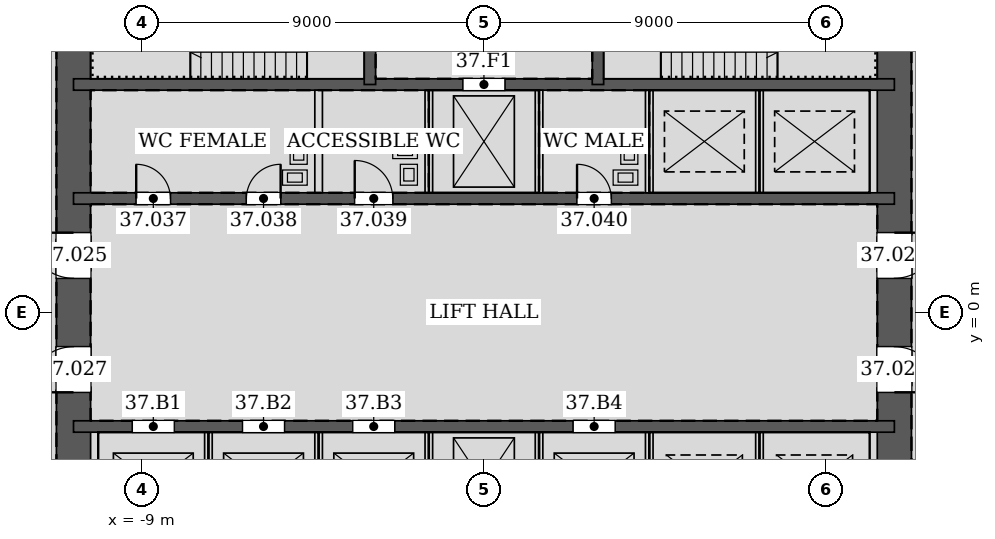
"""IFC4 building model, lengths in metres.
Left out: names, types, materials, properties, quantities, classifications, styles, units other than length and angle.
Written with IfcOpenShell. Run it as: python <this file> out.ifc"""

import sys

from ifc_helpers import new_model, si_unit, direction, frame, frame_2d, origin, place, context, subcontext, project, spatial, rectangle, extrude, element, fill, save


model = new_model("IFC4")
c1 = context("Model", 3, precision=1e-05, world=origin(), true_north=direction((0.0, 1.0)))
c2 = subcontext(c1, "Body", "Model", "MODEL_VIEW")
j1 = project(units=[si_unit("LENGTHUNIT", "METRE"), si_unit("PLANEANGLEUNIT", "RADIAN")], contexts=[c1])
p1 = place(None, origin())
s1 = spatial("IfcSite", under=j1, at=p1, CompositionType="ELEMENT")
p2 = place(p1, origin())
s2 = spatial("IfcBuilding", under=s1, at=p2, CompositionType="ELEMENT")
p3 = place(p2, frame((0.0, 0.0, 163.8)))
s3 = spatial("IfcBuildingStorey", under=s2, at=p3, CompositionType="ELEMENT", Elevation=163.8)
p4 = place(p3, frame((10.8, -10.8, 0.0), z_axis=(0.0, 0.0, 1.0), x_axis=(0.0, 1.0, 0.0)))
e1 = element("IfcWall", 1, at=p4, inside=s3, PredefinedType="SOLIDWALL", context=c2, shape_type="SweptSolid", body=[
    extrude(rectangle(XDim=21.6, YDim=0.9, at=frame_2d((10.8, 0.0))), origin(), (0.0, 0.0, 1.0), 4.2),
])
p5 = place(p4, frame((11.7, 0.0, 0.0)))
e2 = element("IfcOpeningElement", 2, at=p5, cuts=e1, PredefinedType="OPENING", context=c2, shape_type="SweptSolid", body=[
    extrude(rectangle(XDim=1.2, YDim=2.1, at=frame_2d((0.6, 1.05))), frame((0.0, 0.46, 0.0), z_axis=(0.0, -1.0, 0.0), x_axis=(1.0, 0.0, 0.0)), (0.0, 0.0, 1.0), 0.92),
])
p6 = place(p4, frame((8.7, 0.0, 0.0)))
e3 = element("IfcOpeningElement", 3, at=p6, cuts=e1, PredefinedType="OPENING", context=c2, shape_type="SweptSolid", body=[
    extrude(rectangle(XDim=1.2, YDim=2.1, at=frame_2d((0.6, 1.05))), frame((0.0, 0.46, 0.0), z_axis=(0.0, -1.0, 0.0), x_axis=(1.0, 0.0, 0.0)), (0.0, 0.0, 1.0), 0.92),
])
p7 = place(p3, frame((-10.8, 10.8, 0.0), z_axis=(0.0, 0.0, 1.0), x_axis=(0.0, -1.0, 0.0)))
e4 = element("IfcWall", 4, at=p7, inside=s3, PredefinedType="SOLIDWALL", context=c2, shape_type="SweptSolid", body=[
    extrude(rectangle(XDim=21.6, YDim=0.9, at=frame_2d((10.8, 0.0))), origin(), (0.0, 0.0, 1.0), 4.2),
])
p8 = place(p7, frame((8.7, 0.0, 0.0)))
e5 = element("IfcOpeningElement", 5, at=p8, cuts=e4, PredefinedType="OPENING", context=c2, shape_type="SweptSolid", body=[
    extrude(rectangle(XDim=1.2, YDim=2.1, at=frame_2d((0.6, 1.05))), frame((0.0, 0.46, 0.0), z_axis=(0.0, -1.0, 0.0), x_axis=(1.0, 0.0, 0.0)), (0.0, 0.0, 1.0), 0.92),
])
p9 = place(p7, frame((11.7, 0.0, 0.0)))
e6 = element("IfcOpeningElement", 6, at=p9, cuts=e4, PredefinedType="OPENING", context=c2, shape_type="SweptSolid", body=[
    extrude(rectangle(XDim=1.2, YDim=2.1, at=frame_2d((0.6, 1.05))), frame((0.0, 0.46, 0.0), z_axis=(0.0, -1.0, 0.0), x_axis=(1.0, 0.0, 0.0)), (0.0, 0.0, 1.0), 0.92),
])
p10 = place(p3, frame((-10.8, 3.0, 0.0), z_axis=(0.0, 0.0, 1.0), x_axis=(1.0, 0.0, 0.0)))
e7 = element("IfcWall", 7, at=p10, inside=s3, PredefinedType="SOLIDWALL", context=c2, shape_type="SweptSolid", body=[
    extrude(rectangle(XDim=21.6, YDim=0.3, at=frame_2d((10.8, 0.0))), origin(), (0.0, 0.0, 1.0), 4.2),
])
p11 = place(p10, frame((1.65, 0.0, 0.0)))
e8 = element("IfcOpeningElement", 8, at=p11, cuts=e7, PredefinedType="OPENING", context=c2, shape_type="SweptSolid", body=[
    extrude(rectangle(XDim=0.9, YDim=2.1, at=frame_2d((0.45, 1.05))), frame((0.0, 0.16, 0.0), z_axis=(0.0, -1.0, 0.0), x_axis=(1.0, 0.0, 0.0)), (0.0, 0.0, 1.0), 0.32),
])
p12 = place(p10, frame((4.55, 0.0, 0.0)))
e9 = element("IfcOpeningElement", 9, at=p12, cuts=e7, PredefinedType="OPENING", context=c2, shape_type="SweptSolid", body=[
    extrude(rectangle(XDim=0.9, YDim=2.1, at=frame_2d((0.45, 1.05))), frame((0.0, 0.16, 0.0), z_axis=(0.0, -1.0, 0.0), x_axis=(1.0, 0.0, 0.0)), (0.0, 0.0, 1.0), 0.32),
])
p13 = place(p10, frame((7.4, 0.0, 0.0)))
e10 = element("IfcOpeningElement", 10, at=p13, cuts=e7, PredefinedType="OPENING", context=c2, shape_type="SweptSolid", body=[
    extrude(rectangle(XDim=1.0, YDim=2.1, at=frame_2d((0.5, 1.05))), frame((0.0, 0.16, 0.0), z_axis=(0.0, -1.0, 0.0), x_axis=(1.0, 0.0, 0.0)), (0.0, 0.0, 1.0), 0.32),
])
p14 = place(p10, frame((13.25, 0.0, 0.0)))
e11 = element("IfcOpeningElement", 11, at=p14, cuts=e7, PredefinedType="OPENING", context=c2, shape_type="SweptSolid", body=[
    extrude(rectangle(XDim=0.9, YDim=2.1, at=frame_2d((0.45, 1.05))), frame((0.0, 0.16, 0.0), z_axis=(0.0, -1.0, 0.0), x_axis=(1.0, 0.0, 0.0)), (0.0, 0.0, 1.0), 0.32),
])
p15 = place(p3, frame((-10.8, 6.0, 0.0), z_axis=(0.0, 0.0, 1.0), x_axis=(1.0, 0.0, 0.0)))
e12 = element("IfcWall", 12, at=p15, inside=s3, PredefinedType="SOLIDWALL", context=c2, shape_type="SweptSolid", body=[
    extrude(rectangle(XDim=21.6, YDim=0.3, at=frame_2d((10.8, 0.0))), origin(), (0.0, 0.0, 1.0), 4.2),
])
p16 = place(p15, frame((10.25, 0.0, 0.0)))
e13 = element("IfcOpeningElement", 13, at=p16, cuts=e12, PredefinedType="OPENING", context=c2, shape_type="SweptSolid", body=[
    extrude(rectangle(XDim=1.1, YDim=2.1, at=frame_2d((0.55, 1.05))), frame((0.0, 0.16, 0.0), z_axis=(0.0, -1.0, 0.0), x_axis=(1.0, 0.0, 0.0)), (0.0, 0.0, 1.0), 0.32),
])
p17 = place(p3, frame((-3.0, 6.0, 0.0), z_axis=(0.0, 0.0, 1.0), x_axis=(0.0, 1.0, 0.0)))
e14 = element("IfcWall", 14, at=p17, inside=s3, PredefinedType="SOLIDWALL", context=c2, shape_type="SweptSolid", body=[
    extrude(rectangle(XDim=4.8, YDim=0.3, at=frame_2d((2.4, 0.0))), origin(), (0.0, 0.0, 1.0), 4.2),
])
p18 = place(p17, frame((1.75, 0.0, 0.0)))
e15 = element("IfcOpeningElement", 15, at=p18, cuts=e14, PredefinedType="OPENING", context=c2, shape_type="SweptSolid", body=[
    extrude(rectangle(XDim=1.0, YDim=2.1, at=frame_2d((0.5, 1.05))), frame((0.0, 0.16, 0.0), z_axis=(0.0, -1.0, 0.0), x_axis=(1.0, 0.0, 0.0)), (0.0, 0.0, 1.0), 0.32),
])
p19 = place(p3, frame((3.0, 6.0, 0.0), z_axis=(0.0, 0.0, 1.0), x_axis=(0.0, 1.0, 0.0)))
e16 = element("IfcWall", 16, at=p19, inside=s3, PredefinedType="SOLIDWALL", context=c2, shape_type="SweptSolid", body=[
    extrude(rectangle(XDim=4.8, YDim=0.3, at=frame_2d((2.4, 0.0))), origin(), (0.0, 0.0, 1.0), 4.2),
])
p20 = place(p19, frame((1.75, 0.0, 0.0)))
e17 = element("IfcOpeningElement", 17, at=p20, cuts=e16, PredefinedType="OPENING", context=c2, shape_type="SweptSolid", body=[
    extrude(rectangle(XDim=1.0, YDim=2.1, at=frame_2d((0.5, 1.05))), frame((0.0, 0.16, 0.0), z_axis=(0.0, -1.0, 0.0), x_axis=(1.0, 0.0, 0.0)), (0.0, 0.0, 1.0), 0.32),
])
p21 = place(p3, frame((-10.8, -3.0, 0.0), z_axis=(0.0, 0.0, 1.0), x_axis=(1.0, 0.0, 0.0)))
e18 = element("IfcWall", 18, at=p21, inside=s3, PredefinedType="SOLIDWALL", context=c2, shape_type="SweptSolid", body=[
    extrude(rectangle(XDim=21.6, YDim=0.3, at=frame_2d((10.8, 0.0))), origin(), (0.0, 0.0, 1.0), 4.2),
])
p22 = place(p21, frame((1.55, 0.0, 0.0)))
e19 = element("IfcOpeningElement", 19, at=p22, cuts=e18, PredefinedType="OPENING", context=c2, shape_type="SweptSolid", body=[
    extrude(rectangle(XDim=1.1, YDim=2.1, at=frame_2d((0.55, 1.05))), frame((0.0, 0.16, 0.0), z_axis=(0.0, -1.0, 0.0), x_axis=(1.0, 0.0, 0.0)), (0.0, 0.0, 1.0), 0.32),
])
p23 = place(p21, frame((4.45, 0.0, 0.0)))
e20 = element("IfcOpeningElement", 20, at=p23, cuts=e18, PredefinedType="OPENING", context=c2, shape_type="SweptSolid", body=[
    extrude(rectangle(XDim=1.1, YDim=2.1, at=frame_2d((0.55, 1.05))), frame((0.0, 0.16, 0.0), z_axis=(0.0, -1.0, 0.0), x_axis=(1.0, 0.0, 0.0)), (0.0, 0.0, 1.0), 0.32),
])
p24 = place(p21, frame((7.35, 0.0, 0.0)))
e21 = element("IfcOpeningElement", 21, at=p24, cuts=e18, PredefinedType="OPENING", context=c2, shape_type="SweptSolid", body=[
    extrude(rectangle(XDim=1.1, YDim=2.1, at=frame_2d((0.55, 1.05))), frame((0.0, 0.16, 0.0), z_axis=(0.0, -1.0, 0.0), x_axis=(1.0, 0.0, 0.0)), (0.0, 0.0, 1.0), 0.32),
])
p25 = place(p21, frame((13.15, 0.0, 0.0)))
e22 = element("IfcOpeningElement", 22, at=p25, cuts=e18, PredefinedType="OPENING", context=c2, shape_type="SweptSolid", body=[
    extrude(rectangle(XDim=1.1, YDim=2.1, at=frame_2d((0.55, 1.05))), frame((0.0, 0.16, 0.0), z_axis=(0.0, -1.0, 0.0), x_axis=(1.0, 0.0, 0.0)), (0.0, 0.0, 1.0), 0.32),
])
for number, where, z_axis, x_axis in (
    (23, (-4.35, 3.15, 0.0), (0.0, 0.0, 1.0), (0.0, 1.0, 0.0)),
    (24, (-1.45, 3.15, 0.0), (0.0, 0.0, 1.0), (0.0, 1.0, 0.0)),
    (25, (1.45, 3.15, 0.0), (0.0, 0.0, 1.0), (0.0, 1.0, 0.0)),
    (26, (4.35, 3.15, 0.0), (0.0, 0.0, 1.0), (0.0, 1.0, 0.0)),
):
    element("IfcWall", number, at=place(p3, frame(where, z_axis=z_axis, x_axis=x_axis)), inside=s3, PredefinedType="PARTITIONING", context=c2, shape_type="SweptSolid", body=[
        extrude(rectangle(XDim=2.7, YDim=0.2, at=frame_2d((1.35, 0.0))), origin(), (0.0, 0.0, 1.0), 4.035),
    ])
for number, where, z_axis, x_axis in (
    (27, (7.25, 3.15, 0.0), (0.0, 0.0, 1.0), (0.0, 1.0, 0.0)),
    (28, (-7.25, -5.85, 0.0), (0.0, 0.0, 1.0), (0.0, 1.0, 0.0)),
    (29, (-4.35, -5.85, 0.0), (0.0, 0.0, 1.0), (0.0, 1.0, 0.0)),
    (30, (-1.45, -5.85, 0.0), (0.0, 0.0, 1.0), (0.0, 1.0, 0.0)),
    (31, (1.45, -5.85, 0.0), (0.0, 0.0, 1.0), (0.0, 1.0, 0.0)),
    (32, (4.35, -5.85, 0.0), (0.0, 0.0, 1.0), (0.0, 1.0, 0.0)),
    (33, (7.25, -5.85, 0.0), (0.0, 0.0, 1.0), (0.0, 1.0, 0.0)),
):
    element("IfcWall", number, at=place(p3, frame(where, z_axis=z_axis, x_axis=x_axis)), inside=s3, PredefinedType="PARTITIONING", context=c2, shape_type="SweptSolid", body=[
        extrude(rectangle(XDim=2.7, YDim=0.2, at=frame_2d((1.35, 0.0))), origin(), (0.0, 0.0, 1.0), 4.2),
    ])
p26 = place(p5, frame((1.2, 0.0, 0.0), z_axis=(0.0, 0.0, 1.0), x_axis=(-1.0, 0.0, 0.0)))
e34 = element("IfcDoor", 34, at=p26, inside=s3, OperationType="SINGLE_SWING_LEFT", PredefinedType="DOOR", context=c2, shape_type="SweptSolid", body=[
    extrude(rectangle(XDim=1.2, YDim=2.1, at=frame_2d((0.6, 1.05))), frame((0.0, 0.025, 0.0), z_axis=(0.0, -1.0, 0.0), x_axis=(1.0, 0.0, 0.0)), (0.0, 0.0, 1.0), 0.05),
])
fill(e2, e34)
p27 = place(p8, frame((1.2, 0.0, 0.0), z_axis=(0.0, 0.0, 1.0), x_axis=(-1.0, 0.0, 0.0)))
e35 = element("IfcDoor", 35, at=p27, inside=s3, OperationType="SINGLE_SWING_RIGHT", PredefinedType="DOOR", context=c2, shape_type="SweptSolid", body=[
    extrude(rectangle(XDim=1.2, YDim=2.1, at=frame_2d((0.6, 1.05))), frame((0.0, 0.025, 0.0), z_axis=(0.0, -1.0, 0.0), x_axis=(1.0, 0.0, 0.0)), (0.0, 0.0, 1.0), 0.05),
])
fill(e5, e35)
p28 = place(p6, frame((1.2, 0.0, 0.0), z_axis=(0.0, 0.0, 1.0), x_axis=(-1.0, 0.0, 0.0)))
e36 = element("IfcDoor", 36, at=p28, inside=s3, OperationType="SINGLE_SWING_RIGHT", PredefinedType="DOOR", context=c2, shape_type="SweptSolid", body=[
    extrude(rectangle(XDim=1.2, YDim=2.1, at=frame_2d((0.6, 1.05))), frame((0.0, 0.025, 0.0), z_axis=(0.0, -1.0, 0.0), x_axis=(1.0, 0.0, 0.0)), (0.0, 0.0, 1.0), 0.05),
])
fill(e3, e36)
p29 = place(p9, frame((1.2, 0.0, 0.0), z_axis=(0.0, 0.0, 1.0), x_axis=(-1.0, 0.0, 0.0)))
e37 = element("IfcDoor", 37, at=p29, inside=s3, OperationType="SINGLE_SWING_LEFT", PredefinedType="DOOR", context=c2, shape_type="SweptSolid", body=[
    extrude(rectangle(XDim=1.2, YDim=2.1, at=frame_2d((0.6, 1.05))), frame((0.0, 0.025, 0.0), z_axis=(0.0, -1.0, 0.0), x_axis=(1.0, 0.0, 0.0)), (0.0, 0.0, 1.0), 0.05),
])
fill(e6, e37)
p30 = place(p11, origin())
e38 = element("IfcDoor", 38, at=p30, inside=s3, OperationType="SINGLE_SWING_LEFT", PredefinedType="DOOR", context=c2, shape_type="SweptSolid", body=[
    extrude(rectangle(XDim=0.9, YDim=2.1, at=frame_2d((0.45, 1.05))), frame((0.0, 0.025, 0.0), z_axis=(0.0, -1.0, 0.0), x_axis=(1.0, 0.0, 0.0)), (0.0, 0.0, 1.0), 0.05),
])
fill(e8, e38)
p31 = place(p12, origin())
e39 = element("IfcDoor", 39, at=p31, inside=s3, OperationType="SINGLE_SWING_RIGHT", PredefinedType="DOOR", context=c2, shape_type="SweptSolid", body=[
    extrude(rectangle(XDim=0.9, YDim=2.1, at=frame_2d((0.45, 1.05))), frame((0.0, 0.025, 0.0), z_axis=(0.0, -1.0, 0.0), x_axis=(1.0, 0.0, 0.0)), (0.0, 0.0, 1.0), 0.05),
])
fill(e9, e39)
p32 = place(p13, origin())
e40 = element("IfcDoor", 40, at=p32, inside=s3, OperationType="SINGLE_SWING_LEFT", PredefinedType="DOOR", context=c2, shape_type="SweptSolid", body=[
    extrude(rectangle(XDim=1.0, YDim=2.1, at=frame_2d((0.5, 1.05))), frame((0.0, 0.025, 0.0), z_axis=(0.0, -1.0, 0.0), x_axis=(1.0, 0.0, 0.0)), (0.0, 0.0, 1.0), 0.05),
])
fill(e10, e40)
p33 = place(p14, origin())
e41 = element("IfcDoor", 41, at=p33, inside=s3, OperationType="SINGLE_SWING_LEFT", PredefinedType="DOOR", context=c2, shape_type="SweptSolid", body=[
    extrude(rectangle(XDim=0.9, YDim=2.1, at=frame_2d((0.45, 1.05))), frame((0.0, 0.025, 0.0), z_axis=(0.0, -1.0, 0.0), x_axis=(1.0, 0.0, 0.0)), (0.0, 0.0, 1.0), 0.05),
])
fill(e11, e41)
p34 = place(p16, origin())
e42 = element("IfcDoor", 42, at=p34, inside=s3, OperationType="DOUBLE_DOOR_SLIDING", PredefinedType="DOOR", context=c2, shape_type="SweptSolid", body=[
    extrude(rectangle(XDim=1.1, YDim=2.1, at=frame_2d((0.55, 1.05))), frame((0.0, 0.025, 0.0), z_axis=(0.0, -1.0, 0.0), x_axis=(1.0, 0.0, 0.0)), (0.0, 0.0, 1.0), 0.05),
])
fill(e13, e42)
p35 = place(p22, origin())
e43 = element("IfcDoor", 43, at=p35, inside=s3, OperationType="DOUBLE_DOOR_SLIDING", PredefinedType="DOOR", context=c2, shape_type="SweptSolid", body=[
    extrude(rectangle(XDim=1.1, YDim=2.1, at=frame_2d((0.55, 1.05))), frame((0.0, 0.025, 0.0), z_axis=(0.0, -1.0, 0.0), x_axis=(1.0, 0.0, 0.0)), (0.0, 0.0, 1.0), 0.05),
])
fill(e19, e43)
p36 = place(p23, origin())
e44 = element("IfcDoor", 44, at=p36, inside=s3, OperationType="DOUBLE_DOOR_SLIDING", PredefinedType="DOOR", context=c2, shape_type="SweptSolid", body=[
    extrude(rectangle(XDim=1.1, YDim=2.1, at=frame_2d((0.55, 1.05))), frame((0.0, 0.025, 0.0), z_axis=(0.0, -1.0, 0.0), x_axis=(1.0, 0.0, 0.0)), (0.0, 0.0, 1.0), 0.05),
])
fill(e20, e44)
p37 = place(p24, origin())
e45 = element("IfcDoor", 45, at=p37, inside=s3, OperationType="DOUBLE_DOOR_SLIDING", PredefinedType="DOOR", context=c2, shape_type="SweptSolid", body=[
    extrude(rectangle(XDim=1.1, YDim=2.1, at=frame_2d((0.55, 1.05))), frame((0.0, 0.025, 0.0), z_axis=(0.0, -1.0, 0.0), x_axis=(1.0, 0.0, 0.0)), (0.0, 0.0, 1.0), 0.05),
])
fill(e21, e45)
p38 = place(p25, origin())
e46 = element("IfcDoor", 46, at=p38, inside=s3, OperationType="DOUBLE_DOOR_SLIDING", PredefinedType="DOOR", context=c2, shape_type="SweptSolid", body=[
    extrude(rectangle(XDim=1.1, YDim=2.1, at=frame_2d((0.55, 1.05))), frame((0.0, 0.025, 0.0), z_axis=(0.0, -1.0, 0.0), x_axis=(1.0, 0.0, 0.0)), (0.0, 0.0, 1.0), 0.05),
])
fill(e22, e46)
save(model, sys.argv[1])
